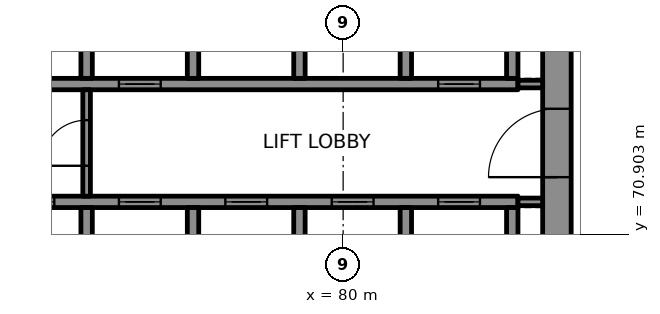
"""IFC4 building model, lengths in metres.
Left out: names, types, materials, properties, quantities, classifications, styles, units other than length and angle.
Written with IfcOpenShell. Run it as: python <this file> out.ifc"""

import sys

from ifc_helpers import new_model, si_unit, direction, frame, frame_2d, origin, place, context, subcontext, project, spatial, rectangle, extrude, element, fill, save


model = new_model("IFC4")
c1 = context("Model", 3, precision=1e-05, world=origin(), true_north=direction((0.0, 1.0)))
c2 = subcontext(c1, "Body", "Model", "MODEL_VIEW")
j1 = project(units=[si_unit("LENGTHUNIT", "METRE"), si_unit("PLANEANGLEUNIT", "RADIAN")], contexts=[c1])
p1 = place(None, origin())
s1 = spatial("IfcSite", under=j1, at=p1, CompositionType="ELEMENT")
p2 = place(p1, origin())
s2 = spatial("IfcBuilding", under=s1, at=p2, CompositionType="ELEMENT")
p3 = place(p2, frame((0.0, 0.0, 159.7)))
s3 = spatial("IfcBuildingStorey", under=s2, at=p3, CompositionType="ELEMENT", Elevation=159.7)
p4 = place(p3, frame((85.625, 67.75, 0.0), z_axis=(0.0, 0.0, 1.0), x_axis=(0.0, 1.0, 0.0)))
e1 = element("IfcWall", 1, at=p4, inside=s3, PredefinedType="SHEAR", context=c2, shape_type="SweptSolid", body=[
    extrude(rectangle(XDim=14.5, YDim=0.75, at=frame_2d((7.25, 0.0))), origin(), (0.0, 0.0, 1.0), 3.7),
])
p5 = place(p4, frame((4.65, 0.0, 0.0)))
e2 = element("IfcOpeningElement", 2, at=p5, cuts=e1, PredefinedType="OPENING", context=c2, shape_type="SweptSolid", body=[
    extrude(rectangle(XDim=1.8, YDim=2.1, at=frame_2d((0.9, 1.05))), frame((0.0, 0.385, 0.0), z_axis=(0.0, -1.0, 0.0), x_axis=(1.0, 0.0, 0.0)), (0.0, 0.0, 1.0), 0.77),
])
p6 = place(p4, frame((11.8, 0.0, 0.0)))
e3 = element("IfcOpeningElement", 3, at=p6, cuts=e1, PredefinedType="OPENING", context=c2, shape_type="SweptSolid", body=[
    extrude(rectangle(XDim=0.9, YDim=2.1, at=frame_2d((0.45, 1.05))), frame((0.0, 0.385, 0.0), z_axis=(0.0, -1.0, 0.0), x_axis=(1.0, 0.0, 0.0)), (0.0, 0.0, 1.0), 0.77),
])
p7 = place(p3, frame((70.3, 71.75, 0.0), z_axis=(0.0, 0.0, 1.0), x_axis=(1.0, 0.0, 0.0)))
e4 = element("IfcWall", 4, at=p7, inside=s3, PredefinedType="SHEAR", context=c2, shape_type="SweptSolid", body=[
    extrude(rectangle(XDim=14.3, YDim=0.3, at=frame_2d((7.15, 0.0))), origin(), (0.0, 0.0, 1.0), 3.7),
])
p8 = place(p7, frame((1.0, 0.0, 0.0)))
e5 = element("IfcOpeningElement", 5, at=p8, cuts=e4, PredefinedType="OPENING", context=c2, shape_type="SweptSolid", body=[
    extrude(rectangle(XDim=1.1, YDim=2.1, at=frame_2d((0.55, 1.05))), frame((0.0, 0.16, 0.0), z_axis=(0.0, -1.0, 0.0), x_axis=(1.0, 0.0, 0.0)), (0.0, 0.0, 1.0), 0.32),
])
p9 = place(p7, frame((3.8, 0.0, 0.0)))
e6 = element("IfcOpeningElement", 6, at=p9, cuts=e4, PredefinedType="OPENING", context=c2, shape_type="SweptSolid", body=[
    extrude(rectangle(XDim=1.1, YDim=2.1, at=frame_2d((0.55, 1.05))), frame((0.0, 0.16, 0.0), z_axis=(0.0, -1.0, 0.0), x_axis=(1.0, 0.0, 0.0)), (0.0, 0.0, 1.0), 0.32),
])
p10 = place(p7, frame((6.6, 0.0, 0.0)))
e7 = element("IfcOpeningElement", 7, at=p10, cuts=e4, PredefinedType="OPENING", context=c2, shape_type="SweptSolid", body=[
    extrude(rectangle(XDim=1.1, YDim=2.1, at=frame_2d((0.55, 1.05))), frame((0.0, 0.16, 0.0), z_axis=(0.0, -1.0, 0.0), x_axis=(1.0, 0.0, 0.0)), (0.0, 0.0, 1.0), 0.32),
])
p11 = place(p7, frame((9.4, 0.0, 0.0)))
e8 = element("IfcOpeningElement", 8, at=p11, cuts=e4, PredefinedType="OPENING", context=c2, shape_type="SweptSolid", body=[
    extrude(rectangle(XDim=1.1, YDim=2.1, at=frame_2d((0.55, 1.05))), frame((0.0, 0.16, 0.0), z_axis=(0.0, -1.0, 0.0), x_axis=(1.0, 0.0, 0.0)), (0.0, 0.0, 1.0), 0.32),
])
p12 = place(p7, frame((12.2, 0.0, 0.0)))
e9 = element("IfcOpeningElement", 9, at=p12, cuts=e4, PredefinedType="OPENING", context=c2, shape_type="SweptSolid", body=[
    extrude(rectangle(XDim=1.1, YDim=2.1, at=frame_2d((0.55, 1.05))), frame((0.0, 0.16, 0.0), z_axis=(0.0, -1.0, 0.0), x_axis=(1.0, 0.0, 0.0)), (0.0, 0.0, 1.0), 0.32),
])
p13 = place(p3, frame((70.3, 74.85, 0.0), z_axis=(0.0, 0.0, 1.0), x_axis=(1.0, 0.0, 0.0)))
e10 = element("IfcWall", 10, at=p13, inside=s3, PredefinedType="SHEAR", context=c2, shape_type="SweptSolid", body=[
    extrude(rectangle(XDim=14.3, YDim=0.3, at=frame_2d((7.15, 0.0))), origin(), (0.0, 0.0, 1.0), 3.7),
])
p14 = place(p13, frame((3.8, 0.0, 0.0)))
e11 = element("IfcOpeningElement", 11, at=p14, cuts=e10, PredefinedType="OPENING", context=c2, shape_type="SweptSolid", body=[
    extrude(rectangle(XDim=1.1, YDim=2.1, at=frame_2d((0.55, 1.05))), frame((0.0, 0.16, 0.0), z_axis=(0.0, -1.0, 0.0), x_axis=(1.0, 0.0, 0.0)), (0.0, 0.0, 1.0), 0.32),
])
p15 = place(p13, frame((12.2, 0.0, 0.0)))
e12 = element("IfcOpeningElement", 12, at=p15, cuts=e10, PredefinedType="OPENING", context=c2, shape_type="SweptSolid", body=[
    extrude(rectangle(XDim=1.1, YDim=2.1, at=frame_2d((0.55, 1.05))), frame((0.0, 0.16, 0.0), z_axis=(0.0, -1.0, 0.0), x_axis=(1.0, 0.0, 0.0)), (0.0, 0.0, 1.0), 0.32),
])
for number, where, z_axis, x_axis in (
    (13, (73.25, 69.0, 0.0), (0.0, 0.0, 1.0), (0.0, 1.0, 0.0)),
    (14, (73.25, 75.0, 0.0), (0.0, 0.0, 1.0), (0.0, 1.0, 0.0)),
    (15, (76.05, 69.0, 0.0), (0.0, 0.0, 1.0), (0.0, 1.0, 0.0)),
    (16, (76.05, 75.0, 0.0), (0.0, 0.0, 1.0), (0.0, 1.0, 0.0)),
    (17, (78.85, 69.0, 0.0), (0.0, 0.0, 1.0), (0.0, 1.0, 0.0)),
    (18, (78.85, 75.0, 0.0), (0.0, 0.0, 1.0), (0.0, 1.0, 0.0)),
    (19, (81.65, 69.0, 0.0), (0.0, 0.0, 1.0), (0.0, 1.0, 0.0)),
    (20, (81.65, 75.0, 0.0), (0.0, 0.0, 1.0), (0.0, 1.0, 0.0)),
    (21, (84.45, 69.0, 0.0), (0.0, 0.0, 1.0), (0.0, 1.0, 0.0)),
    (22, (84.45, 75.0, 0.0), (0.0, 0.0, 1.0), (0.0, 1.0, 0.0)),
):
    element("IfcWall", number, at=place(p3, frame(where, z_axis=z_axis, x_axis=x_axis)), inside=s3, PredefinedType="SHEAR", context=c2, shape_type="SweptSolid", body=[
        extrude(rectangle(XDim=2.6, YDim=0.3, at=frame_2d((1.3, 0.0))), origin(), (0.0, 0.0, 1.0), 3.7),
    ])
for number, where, z_axis, x_axis in (
    (23, (84.6, 71.75, 0.0), (0.0, 0.0, 1.0), (1.0, 0.0, 0.0)),
    (24, (84.6, 74.85, 0.0), (0.0, 0.0, 1.0), (1.0, 0.0, 0.0)),
):
    element("IfcWall", number, at=place(p3, frame(where, z_axis=z_axis, x_axis=x_axis)), inside=s3, PredefinedType="PARTITIONING", context=c2, shape_type="SweptSolid", body=[
        extrude(rectangle(XDim=0.65, YDim=0.2, at=frame_2d((0.325, 0.0))), origin(), (0.0, 0.0, 1.0), 3.7),
    ])
p16 = place(p3, frame((73.25, 71.9, 0.0), z_axis=(0.0, 0.0, 1.0), x_axis=(0.0, 1.0, 0.0)))
e25 = element("IfcWall", 25, at=p16, inside=s3, PredefinedType="PARTITIONING", context=c2, shape_type="SweptSolid", body=[
    extrude(rectangle(XDim=2.8, YDim=0.2, at=frame_2d((1.4, 0.0))), origin(), (0.0, 0.0, 1.0), 3.7),
])
p17 = place(p16, frame((0.8, 0.0, 0.0)))
e26 = element("IfcOpeningElement", 26, at=p17, cuts=e25, PredefinedType="OPENING", context=c2, shape_type="SweptSolid", body=[
    extrude(rectangle(XDim=1.2, YDim=2.1, at=frame_2d((0.6, 1.05))), frame((0.0, 0.11, 0.0), z_axis=(0.0, -1.0, 0.0), x_axis=(1.0, 0.0, 0.0)), (0.0, 0.0, 1.0), 0.22),
])
p18 = place(p8, origin())
e27 = element("IfcDoor", 27, at=p18, inside=s3, OperationType="DOUBLE_DOOR_SLIDING", PredefinedType="DOOR", context=c2, shape_type="SweptSolid", body=[
    extrude(rectangle(XDim=1.1, YDim=2.1, at=frame_2d((0.55, 1.05))), frame((0.0, 0.025, 0.0), z_axis=(0.0, -1.0, 0.0), x_axis=(1.0, 0.0, 0.0)), (0.0, 0.0, 1.0), 0.05),
])
fill(e5, e27)
p19 = place(p9, origin())
e28 = element("IfcDoor", 28, at=p19, inside=s3, OperationType="DOUBLE_DOOR_SLIDING", PredefinedType="DOOR", context=c2, shape_type="SweptSolid", body=[
    extrude(rectangle(XDim=1.1, YDim=2.1, at=frame_2d((0.55, 1.05))), frame((0.0, 0.025, 0.0), z_axis=(0.0, -1.0, 0.0), x_axis=(1.0, 0.0, 0.0)), (0.0, 0.0, 1.0), 0.05),
])
fill(e6, e28)
p20 = place(p10, origin())
e29 = element("IfcDoor", 29, at=p20, inside=s3, OperationType="DOUBLE_DOOR_SLIDING", PredefinedType="DOOR", context=c2, shape_type="SweptSolid", body=[
    extrude(rectangle(XDim=1.1, YDim=2.1, at=frame_2d((0.55, 1.05))), frame((0.0, 0.025, 0.0), z_axis=(0.0, -1.0, 0.0), x_axis=(1.0, 0.0, 0.0)), (0.0, 0.0, 1.0), 0.05),
])
fill(e7, e29)
p21 = place(p11, origin())
e30 = element("IfcDoor", 30, at=p21, inside=s3, OperationType="DOUBLE_DOOR_SLIDING", PredefinedType="DOOR", context=c2, shape_type="SweptSolid", body=[
    extrude(rectangle(XDim=1.1, YDim=2.1, at=frame_2d((0.55, 1.05))), frame((0.0, 0.025, 0.0), z_axis=(0.0, -1.0, 0.0), x_axis=(1.0, 0.0, 0.0)), (0.0, 0.0, 1.0), 0.05),
])
fill(e8, e30)
p22 = place(p12, origin())
e31 = element("IfcDoor", 31, at=p22, inside=s3, OperationType="DOUBLE_DOOR_SLIDING", PredefinedType="DOOR", context=c2, shape_type="SweptSolid", body=[
    extrude(rectangle(XDim=1.1, YDim=2.1, at=frame_2d((0.55, 1.05))), frame((0.0, 0.025, 0.0), z_axis=(0.0, -1.0, 0.0), x_axis=(1.0, 0.0, 0.0)), (0.0, 0.0, 1.0), 0.05),
])
fill(e9, e31)
p23 = place(p14, origin())
e32 = element("IfcDoor", 32, at=p23, inside=s3, OperationType="DOUBLE_DOOR_SLIDING", PredefinedType="DOOR", context=c2, shape_type="SweptSolid", body=[
    extrude(rectangle(XDim=1.1, YDim=2.1, at=frame_2d((0.55, 1.05))), frame((0.0, 0.025, 0.0), z_axis=(0.0, -1.0, 0.0), x_axis=(1.0, 0.0, 0.0)), (0.0, 0.0, 1.0), 0.05),
])
fill(e11, e32)
p24 = place(p15, origin())
e33 = element("IfcDoor", 33, at=p24, inside=s3, OperationType="DOUBLE_DOOR_SLIDING", PredefinedType="DOOR", context=c2, shape_type="SweptSolid", body=[
    extrude(rectangle(XDim=1.1, YDim=2.1, at=frame_2d((0.55, 1.05))), frame((0.0, 0.025, 0.0), z_axis=(0.0, -1.0, 0.0), x_axis=(1.0, 0.0, 0.0)), (0.0, 0.0, 1.0), 0.05),
])
fill(e12, e33)
p25 = place(p17, origin())
e34 = element("IfcDoor", 34, at=p25, inside=s3, OperationType="SINGLE_SWING_LEFT", PredefinedType="DOOR", context=c2, shape_type="SweptSolid", body=[
    extrude(rectangle(XDim=1.2, YDim=2.1, at=frame_2d((0.6, 1.05))), frame((0.0, 0.025, 0.0), z_axis=(0.0, -1.0, 0.0), x_axis=(1.0, 0.0, 0.0)), (0.0, 0.0, 1.0), 0.05),
])
fill(e26, e34)
p26 = place(p5, origin())
e35 = element("IfcDoor", 35, at=p26, inside=s3, OperationType="SINGLE_SWING_RIGHT", PredefinedType="DOOR", context=c2, shape_type="SweptSolid", body=[
    extrude(rectangle(XDim=1.8, YDim=2.1, at=frame_2d((0.9, 1.05))), frame((0.0, 0.095, 0.0), z_axis=(0.0, -1.0, 0.0), x_axis=(1.0, 0.0, 0.0)), (0.0, 0.0, 1.0), 0.19),
])
fill(e2, e35)
save(model, sys.argv[1])
